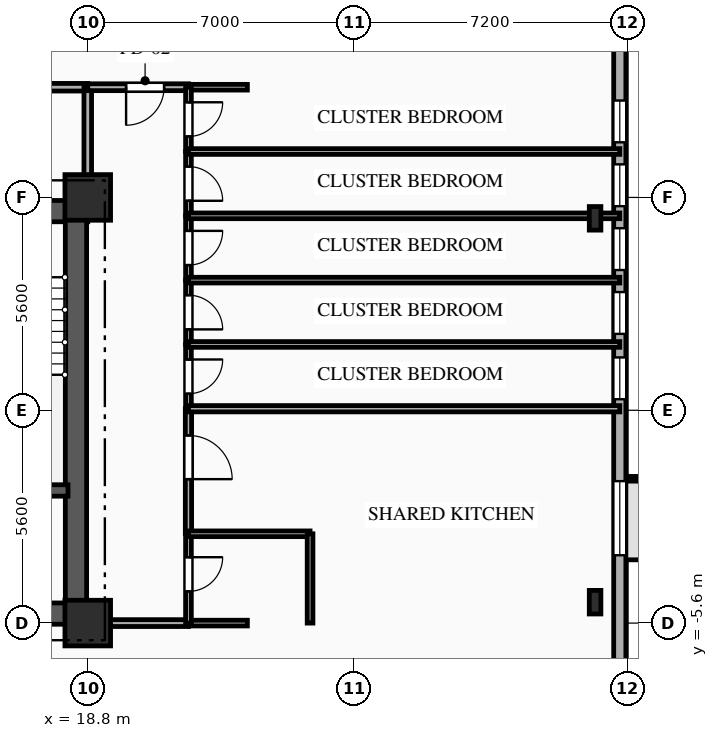
"""IFC4 building model, lengths in metres.
Left out: names, types, materials, properties, quantities, classifications, styles, units other than length and angle.
Written with IfcOpenShell. Run it as: python <this file> out.ifc"""

import sys

from ifc_helpers import new_model, si_unit, direction, frame, frame_2d, origin, origin_2d, place, context, subcontext, project, spatial, rectangle, i_section, extrude, element, fill, save


model = new_model("IFC4")
c1 = context("Model", 3, precision=1e-05, world=origin(), true_north=direction((0.0, 1.0)))
c2 = subcontext(c1, "Body", "Model", "MODEL_VIEW")
j1 = project(units=[si_unit("LENGTHUNIT", "METRE"), si_unit("PLANEANGLEUNIT", "RADIAN")], contexts=[c1])
p1 = place(None, origin())
s1 = spatial("IfcSite", under=j1, at=p1, CompositionType="ELEMENT")
p2 = place(p1, origin())
s2 = spatial("IfcBuilding", under=s1, at=p2, CompositionType="ELEMENT")
p3 = place(p2, frame((0.0, 0.0, 53.8)))
s3 = spatial("IfcBuildingStorey", under=s2, at=p3, CompositionType="ELEMENT", Elevation=53.8)
for number, where, z_axis, x_axis in (
    (1, (18.8, -5.6, 0.0), (0.0, 0.0, 1.0), (1.0, 0.0, 0.0)),
    (2, (18.8, 5.6, 0.0), (0.0, 0.0, 1.0), (1.0, 0.0, 0.0)),
):
    element("IfcColumn", number, at=place(p3, frame(where, z_axis=z_axis, x_axis=x_axis)), inside=s3, PredefinedType="COLUMN", context=c2, shape_type="SweptSolid", body=[
        extrude(rectangle(XDim=1.2, YDim=1.2, at=origin_2d()), origin(), (0.0, 0.0, 1.0), 3.35),
    ])
for number, where, z_axis, x_axis in (
    (3, (32.15, -5.05, 0.0), (0.0, 0.0, 1.0), (1.0, 0.0, 0.0)),
    (4, (32.15, 5.05, 0.0), (0.0, 0.0, 1.0), (1.0, 0.0, 0.0)),
):
    element("IfcColumn", number, at=place(p3, frame(where, z_axis=z_axis, x_axis=x_axis)), inside=s3, PredefinedType="COLUMN", context=c2, shape_type="SweptSolid", body=[
        extrude(i_section(OverallWidth=0.305, OverallDepth=0.62, WebThickness=0.021, FlangeThickness=0.04, FilletRadius=0.027, at=origin_2d()), origin(), (0.0, 0.0, 1.0), 3.35),
    ])
p4 = place(p3, frame((32.8, 15.8, 0.0), z_axis=(0.0, 0.0, 1.0), x_axis=(0.0, -1.0, 0.0)))
e5 = element("IfcWall", 5, at=p4, inside=s3, PredefinedType="SOLIDWALL", context=c2, shape_type="SweptSolid", body=[
    extrude(rectangle(XDim=31.6, YDim=0.32, at=frame_2d((15.8, 0.0))), origin(), (0.0, 0.0, 1.0), 3.035),
])
p5 = place(p4, frame((7.65, 0.0, 0.85)))
e6 = element("IfcOpeningElement", 6, at=p5, cuts=e5, PredefinedType="OPENING", context=c2, shape_type="SweptSolid", body=[
    extrude(rectangle(XDim=1.1, YDim=1.85, at=frame_2d((0.55, 0.925))), frame((0.0, 0.17, 0.0), z_axis=(0.0, -1.0, 0.0), x_axis=(1.0, 0.0, 0.0)), (0.0, 0.0, 1.0), 0.34),
])
p6 = place(p4, frame((9.33, 0.0, 0.85)))
e7 = element("IfcOpeningElement", 7, at=p6, cuts=e5, PredefinedType="OPENING", context=c2, shape_type="SweptSolid", body=[
    extrude(rectangle(XDim=1.1, YDim=1.85, at=frame_2d((0.55, 0.925))), frame((0.0, 0.17, 0.0), z_axis=(0.0, -1.0, 0.0), x_axis=(1.0, 0.0, 0.0)), (0.0, 0.0, 1.0), 0.34),
])
p7 = place(p4, frame((11.01, 0.0, 0.85)))
e8 = element("IfcOpeningElement", 8, at=p7, cuts=e5, PredefinedType="OPENING", context=c2, shape_type="SweptSolid", body=[
    extrude(rectangle(XDim=1.1, YDim=1.85, at=frame_2d((0.55, 0.925))), frame((0.0, 0.17, 0.0), z_axis=(0.0, -1.0, 0.0), x_axis=(1.0, 0.0, 0.0)), (0.0, 0.0, 1.0), 0.34),
])
p8 = place(p4, frame((12.69, 0.0, 0.85)))
e9 = element("IfcOpeningElement", 9, at=p8, cuts=e5, PredefinedType="OPENING", context=c2, shape_type="SweptSolid", body=[
    extrude(rectangle(XDim=1.1, YDim=1.85, at=frame_2d((0.55, 0.925))), frame((0.0, 0.17, 0.0), z_axis=(0.0, -1.0, 0.0), x_axis=(1.0, 0.0, 0.0)), (0.0, 0.0, 1.0), 0.34),
])
p9 = place(p4, frame((14.41, 0.0, 0.85)))
e10 = element("IfcOpeningElement", 10, at=p9, cuts=e5, PredefinedType="OPENING", context=c2, shape_type="SweptSolid", body=[
    extrude(rectangle(XDim=1.1, YDim=1.85, at=frame_2d((0.55, 0.925))), frame((0.0, 0.17, 0.0), z_axis=(0.0, -1.0, 0.0), x_axis=(1.0, 0.0, 0.0)), (0.0, 0.0, 1.0), 0.34),
])
p10 = place(p4, frame((17.665, 0.0, 0.85)))
e11 = element("IfcOpeningElement", 11, at=p10, cuts=e5, PredefinedType="OPENING", context=c2, shape_type="SweptSolid", body=[
    extrude(rectangle(XDim=1.95, YDim=1.85, at=frame_2d((0.975, 0.925))), frame((0.0, 0.17, 0.0), z_axis=(0.0, -1.0, 0.0), x_axis=(1.0, 0.0, 0.0)), (0.0, 0.0, 1.0), 0.34),
])
p11 = place(p3, frame((9.2, 5.24, 0.0), z_axis=(0.0, 0.0, 1.0), x_axis=(1.0, 0.0, 0.0)))
e12 = element("IfcWall", 12, at=p11, inside=s3, PredefinedType="SHEAR", context=c2, shape_type="SweptSolid", body=[
    extrude(rectangle(XDim=9.6, YDim=0.56, at=frame_2d((4.8, 0.0))), origin(), (0.0, 0.0, 1.0), 3.035),
])
p12 = place(p11, frame((6.95, 0.0, 0.0)))
e13 = element("IfcOpeningElement", 13, at=p12, cuts=e12, PredefinedType="OPENING", context=c2, shape_type="SweptSolid", body=[
    extrude(rectangle(XDim=1.1, YDim=2.15, at=frame_2d((0.55, 1.075))), frame((0.0, 0.29, 0.0), z_axis=(0.0, -1.0, 0.0), x_axis=(1.0, 0.0, 0.0)), (0.0, 0.0, 1.0), 0.58),
])
p13 = place(p11, frame((3.775, 0.0, 0.0)))
e14 = element("IfcOpeningElement", 14, at=p13, cuts=e12, PredefinedType="OPENING", context=c2, shape_type="SweptSolid", body=[
    extrude(rectangle(XDim=1.05, YDim=2.1, at=frame_2d((0.525, 1.05))), frame((0.0, 0.29, 0.0), z_axis=(0.0, -1.0, 0.0), x_axis=(1.0, 0.0, 0.0)), (0.0, 0.0, 1.0), 0.58),
])
p14 = place(p3, frame((9.2, -5.35, 0.0), z_axis=(0.0, 0.0, 1.0), x_axis=(1.0, 0.0, 0.0)))
e15 = element("IfcWall", 15, at=p14, inside=s3, PredefinedType="SHEAR", context=c2, shape_type="SweptSolid", body=[
    extrude(rectangle(XDim=9.6, YDim=0.56, at=frame_2d((4.8, 0.0))), origin(), (0.0, 0.0, 1.0), 3.035),
])
p15 = place(p14, frame((7.65, 0.0, 0.0)))
e16 = element("IfcOpeningElement", 16, at=p15, cuts=e15, PredefinedType="OPENING", context=c2, shape_type="SweptSolid", body=[
    extrude(rectangle(XDim=0.9, YDim=2.1, at=frame_2d((0.45, 1.05))), frame((0.0, 0.29, 0.0), z_axis=(0.0, -1.0, 0.0), x_axis=(1.0, 0.0, 0.0)), (0.0, 0.0, 1.0), 0.58),
])
p16 = place(p3, frame((18.49, -5.05, 0.0), z_axis=(0.0, 0.0, 1.0), x_axis=(0.0, 1.0, 0.0)))
e17 = element("IfcWall", 17, at=p16, inside=s3, PredefinedType="SHEAR", context=c2, shape_type="SweptSolid", body=[
    extrude(rectangle(XDim=10.1, YDim=0.56, at=frame_2d((5.05, 0.0))), origin(), (0.0, 0.0, 1.0), 3.035),
])
p17 = place(p3, frame((15.1, -2.11, 0.0), z_axis=(0.0, 0.0, 1.0), x_axis=(1.0, 0.0, 0.0)))
e18 = element("IfcWall", 18, at=p17, inside=s3, PredefinedType="SHEAR", context=c2, shape_type="SweptSolid", body=[
    extrude(rectangle(XDim=3.18, YDim=0.3, at=frame_2d((1.59, 0.0))), origin(), (0.0, 0.0, 1.0), 3.035),
])
p18 = place(p3, frame((18.8, 8.5, 0.0), z_axis=(0.0, 0.0, 1.0), x_axis=(-1.0, 0.0, 0.0)))
e19 = element("IfcWall", 19, at=p18, inside=s3, PredefinedType="PARTITIONING", context=c2, shape_type="SweptSolid", body=[
    extrude(rectangle(XDim=6.8, YDim=0.2, at=frame_2d((3.4, 0.0))), origin(), (0.0, 0.0, 1.0), 3.035),
])
p19 = place(p18, frame((3.985, 0.0, 0.0)))
e20 = element("IfcOpeningElement", 20, at=p19, cuts=e19, PredefinedType="OPENING", context=c2, shape_type="SweptSolid", body=[
    extrude(rectangle(XDim=1.1, YDim=2.15, at=frame_2d((0.55, 1.075))), frame((0.0, 0.11, 0.0), z_axis=(0.0, -1.0, 0.0), x_axis=(1.0, 0.0, 0.0)), (0.0, 0.0, 1.0), 0.22),
])
p20 = place(p3, frame((18.8, 5.6, 0.0), z_axis=(0.0, 0.0, 1.0), x_axis=(0.0, 1.0, 0.0)))
e21 = element("IfcWall", 21, at=p20, inside=s3, PredefinedType="PARTITIONING", context=c2, shape_type="SweptSolid", body=[
    extrude(rectangle(XDim=2.9, YDim=0.2, at=frame_2d((1.45, 0.0))), origin(), (0.0, 0.0, 1.0), 2.52),
])
p21 = place(p3, frame((21.45, 8.5, 0.0), z_axis=(0.0, 0.0, 1.0), x_axis=(-1.0, 0.0, 0.0)))
e22 = element("IfcWall", 22, at=p21, inside=s3, PredefinedType="PARTITIONING", context=c2, shape_type="SweptSolid", body=[
    extrude(rectangle(XDim=2.65, YDim=0.18, at=frame_2d((1.325, 0.0))), origin(), (0.0, 0.0, 1.0), 3.035),
])
p22 = place(p21, frame((0.641, 0.0, 0.0)))
e23 = element("IfcOpeningElement", 23, at=p22, cuts=e22, PredefinedType="OPENING", context=c2, shape_type="SweptSolid", body=[
    extrude(rectangle(XDim=1.0, YDim=2.15, at=frame_2d((0.5, 1.075))), frame((0.0, 0.1, 0.0), z_axis=(0.0, -1.0, 0.0), x_axis=(1.0, 0.0, 0.0)), (0.0, 0.0, 1.0), 0.2),
])
p23 = place(p3, frame((23.0, 8.5, 0.0), z_axis=(0.0, 0.0, 1.0), x_axis=(-1.0, 0.0, 0.0)))
e24 = element("IfcWall", 24, at=p23, inside=s3, PredefinedType="PARTITIONING", context=c2, shape_type="SweptSolid", body=[
    extrude(rectangle(XDim=1.55, YDim=0.15, at=frame_2d((0.775, 0.0))), origin(), (0.0, 0.0, 1.0), 3.035),
])
p24 = place(p3, frame((18.8, -5.6, 0.0), z_axis=(0.0, 0.0, 1.0), x_axis=(1.0, 0.0, 0.0)))
e25 = element("IfcWall", 25, at=p24, inside=s3, PredefinedType="PARTITIONING", context=c2, shape_type="SweptSolid", body=[
    extrude(rectangle(XDim=2.65, YDim=0.18, at=frame_2d((1.325, 0.0))), origin(), (0.0, 0.0, 1.0), 3.035),
])
p25 = place(p3, frame((21.45, -5.6, 0.0), z_axis=(0.0, 0.0, 1.0), x_axis=(1.0, 0.0, 0.0)))
e26 = element("IfcWall", 26, at=p25, inside=s3, PredefinedType="PLUMBINGWALL", context=c2, shape_type="SweptSolid", body=[
    extrude(rectangle(XDim=1.55, YDim=0.15, at=frame_2d((0.775, 0.0))), origin(), (0.0, 0.0, 1.0), 3.035),
])
p26 = place(p3, frame((21.45, -3.25, 0.0), z_axis=(0.0, 0.0, 1.0), x_axis=(0.0, -1.0, 0.0)))
e27 = element("IfcWall", 27, at=p26, inside=s3, PredefinedType="PLUMBINGWALL", context=c2, shape_type="SweptSolid", body=[
    extrude(rectangle(XDim=2.35, YDim=0.15, at=frame_2d((1.175, 0.0))), origin(), (0.0, 0.0, 1.0), 3.035),
])
p27 = place(p26, frame((0.616, 0.0, 0.0)))
e28 = element("IfcOpeningElement", 28, at=p27, cuts=e27, PredefinedType="OPENING", context=c2, shape_type="SweptSolid", body=[
    extrude(rectangle(XDim=0.9, YDim=2.1, at=frame_2d((0.45, 1.05))), frame((0.0, 0.085, 0.0), z_axis=(0.0, -1.0, 0.0), x_axis=(1.0, 0.0, 0.0)), (0.0, 0.0, 1.0), 0.17),
])
p28 = place(p3, frame((21.45, 0.04, 0.0), z_axis=(0.0, 0.0, 1.0), x_axis=(0.0, -1.0, 0.0)))
e29 = element("IfcWall", 29, at=p28, inside=s3, PredefinedType="PARTITIONING", context=c2, shape_type="SweptSolid", body=[
    extrude(rectangle(XDim=3.29, YDim=0.165, at=frame_2d((1.645, 0.0))), origin(), (0.0, 0.0, 1.0), 3.035),
])
p29 = place(p28, frame((0.702, 0.0, 0.0)))
e30 = element("IfcOpeningElement", 30, at=p29, cuts=e29, PredefinedType="OPENING", context=c2, shape_type="SweptSolid", body=[
    extrude(rectangle(XDim=1.15, YDim=2.15, at=frame_2d((0.575, 1.075))), frame((0.0, 0.093, 0.0), z_axis=(0.0, -1.0, 0.0), x_axis=(1.0, 0.0, 0.0)), (0.0, 0.0, 1.0), 0.185),
])
p30 = place(p3, frame((21.45, 1.732, 0.0), z_axis=(0.0, 0.0, 1.0), x_axis=(0.0, -1.0, 0.0)))
e31 = element("IfcWall", 31, at=p30, inside=s3, PredefinedType="PARTITIONING", context=c2, shape_type="SweptSolid", body=[
    extrude(rectangle(XDim=1.692, YDim=0.15, at=frame_2d((0.846, 0.0))), origin(), (0.0, 0.0, 1.0), 3.035),
])
p31 = place(p30, frame((0.396, 0.0, 0.0)))
e32 = element("IfcOpeningElement", 32, at=p31, cuts=e31, PredefinedType="OPENING", context=c2, shape_type="SweptSolid", body=[
    extrude(rectangle(XDim=0.9, YDim=2.1, at=frame_2d((0.45, 1.05))), frame((0.0, 0.085, 0.0), z_axis=(0.0, -1.0, 0.0), x_axis=(1.0, 0.0, 0.0)), (0.0, 0.0, 1.0), 0.17),
])
p32 = place(p3, frame((21.45, 3.424, 0.0), z_axis=(0.0, 0.0, 1.0), x_axis=(0.0, -1.0, 0.0)))
e33 = element("IfcWall", 33, at=p32, inside=s3, PredefinedType="PARTITIONING", context=c2, shape_type="SweptSolid", body=[
    extrude(rectangle(XDim=1.692, YDim=0.15, at=frame_2d((0.846, 0.0))), origin(), (0.0, 0.0, 1.0), 3.035),
])
p33 = place(p32, frame((0.396, 0.0, 0.0)))
e34 = element("IfcOpeningElement", 34, at=p33, cuts=e33, PredefinedType="OPENING", context=c2, shape_type="SweptSolid", body=[
    extrude(rectangle(XDim=0.9, YDim=2.1, at=frame_2d((0.45, 1.05))), frame((0.0, 0.085, 0.0), z_axis=(0.0, -1.0, 0.0), x_axis=(1.0, 0.0, 0.0)), (0.0, 0.0, 1.0), 0.17),
])
p34 = place(p3, frame((21.45, 5.116, 0.0), z_axis=(0.0, 0.0, 1.0), x_axis=(0.0, -1.0, 0.0)))
e35 = element("IfcWall", 35, at=p34, inside=s3, PredefinedType="PARTITIONING", context=c2, shape_type="SweptSolid", body=[
    extrude(rectangle(XDim=1.692, YDim=0.15, at=frame_2d((0.846, 0.0))), origin(), (0.0, 0.0, 1.0), 3.035),
])
p35 = place(p34, frame((0.396, 0.0, 0.0)))
e36 = element("IfcOpeningElement", 36, at=p35, cuts=e35, PredefinedType="OPENING", context=c2, shape_type="SweptSolid", body=[
    extrude(rectangle(XDim=0.9, YDim=2.1, at=frame_2d((0.45, 1.05))), frame((0.0, 0.085, 0.0), z_axis=(0.0, -1.0, 0.0), x_axis=(1.0, 0.0, 0.0)), (0.0, 0.0, 1.0), 0.17),
])
p36 = place(p3, frame((21.45, 6.808, 0.0), z_axis=(0.0, 0.0, 1.0), x_axis=(0.0, -1.0, 0.0)))
e37 = element("IfcWall", 37, at=p36, inside=s3, PredefinedType="PARTITIONING", context=c2, shape_type="SweptSolid", body=[
    extrude(rectangle(XDim=1.692, YDim=0.15, at=frame_2d((0.846, 0.0))), origin(), (0.0, 0.0, 1.0), 3.035),
])
p37 = place(p36, frame((0.396, 0.0, 0.0)))
e38 = element("IfcOpeningElement", 38, at=p37, cuts=e37, PredefinedType="OPENING", context=c2, shape_type="SweptSolid", body=[
    extrude(rectangle(XDim=0.9, YDim=2.1, at=frame_2d((0.45, 1.05))), frame((0.0, 0.085, 0.0), z_axis=(0.0, -1.0, 0.0), x_axis=(1.0, 0.0, 0.0)), (0.0, 0.0, 1.0), 0.17),
])
p38 = place(p3, frame((21.45, 8.5, 0.0), z_axis=(0.0, 0.0, 1.0), x_axis=(0.0, -1.0, 0.0)))
e39 = element("IfcWall", 39, at=p38, inside=s3, PredefinedType="PARTITIONING", context=c2, shape_type="SweptSolid", body=[
    extrude(rectangle(XDim=1.692, YDim=0.15, at=frame_2d((0.846, 0.0))), origin(), (0.0, 0.0, 1.0), 3.035),
])
p39 = place(p38, frame((0.396, 0.0, 0.0)))
e40 = element("IfcOpeningElement", 40, at=p39, cuts=e39, PredefinedType="OPENING", context=c2, shape_type="SweptSolid", body=[
    extrude(rectangle(XDim=0.9, YDim=2.1, at=frame_2d((0.45, 1.05))), frame((0.0, 0.085, 0.0), z_axis=(0.0, -1.0, 0.0), x_axis=(1.0, 0.0, 0.0)), (0.0, 0.0, 1.0), 0.17),
])
p40 = place(p3, frame((21.45, -3.25, 0.0), z_axis=(0.0, 0.0, 1.0), x_axis=(1.0, 0.0, 0.0)))
e41 = element("IfcWall", 41, at=p40, inside=s3, PredefinedType="PLUMBINGWALL", context=c2, shape_type="SweptSolid", body=[
    extrude(rectangle(XDim=3.2, YDim=0.15, at=frame_2d((1.6, 0.0))), origin(), (0.0, 0.0, 1.0), 2.52),
])
p41 = place(p3, frame((24.65, -3.25, 0.0), z_axis=(0.0, 0.0, 1.0), x_axis=(0.0, -1.0, 0.0)))
e42 = element("IfcWall", 42, at=p41, inside=s3, PredefinedType="PLUMBINGWALL", context=c2, shape_type="SweptSolid", body=[
    extrude(rectangle(XDim=2.35, YDim=0.15, at=frame_2d((1.175, 0.0))), origin(), (0.0, 0.0, 1.0), 3.035),
])
p42 = place(p3, frame((21.45, 0.04, 0.0), z_axis=(0.0, 0.0, 1.0), x_axis=(1.0, 0.0, 0.0)))
e43 = element("IfcWall", 43, at=p42, inside=s3, PredefinedType="PARTITIONING", context=c2, shape_type="SweptSolid", body=[
    extrude(rectangle(XDim=11.35, YDim=0.165, at=frame_2d((5.675, 0.0))), origin(), (0.0, 0.0, 1.0), 3.035),
])
p43 = place(p3, frame((21.45, 1.732, 0.0), z_axis=(0.0, 0.0, 1.0), x_axis=(1.0, 0.0, 0.0)))
e44 = element("IfcWall", 44, at=p43, inside=s3, PredefinedType="PARTITIONING", context=c2, shape_type="SweptSolid", body=[
    extrude(rectangle(XDim=11.35, YDim=0.15, at=frame_2d((5.675, 0.0))), origin(), (0.0, 0.0, 1.0), 3.035),
])
for number, where, z_axis, x_axis in (
    (45, (21.45, 3.424, 0.0), (0.0, 0.0, 1.0), (1.0, 0.0, 0.0)),
    (46, (21.45, 5.116, 0.0), (0.0, 0.0, 1.0), (1.0, 0.0, 0.0)),
):
    element("IfcWall", number, at=place(p3, frame(where, z_axis=z_axis, x_axis=x_axis)), inside=s3, PredefinedType="PARTITIONING", context=c2, shape_type="SweptSolid", body=[
        extrude(rectangle(XDim=11.35, YDim=0.15, at=frame_2d((5.675, 0.0))), origin(), (0.0, 0.0, 1.0), 2.52),
    ])
p44 = place(p3, frame((21.45, 6.808, 0.0), z_axis=(0.0, 0.0, 1.0), x_axis=(1.0, 0.0, 0.0)))
e47 = element("IfcWall", 47, at=p44, inside=s3, PredefinedType="PARTITIONING", context=c2, shape_type="SweptSolid", body=[
    extrude(rectangle(XDim=11.35, YDim=0.15, at=frame_2d((5.675, 0.0))), origin(), (0.0, 0.0, 1.0), 3.035),
])
p45 = place(p5, origin())
e48 = element("IfcWindow", 48, at=p45, inside=s3, PartitioningType="SINGLE_PANEL", PredefinedType="WINDOW", context=c2, shape_type="SweptSolid", body=[
    extrude(rectangle(XDim=1.1, YDim=1.85, at=frame_2d((0.55, 0.925))), frame((0.0, 0.03, 0.0), z_axis=(0.0, -1.0, 0.0), x_axis=(1.0, 0.0, 0.0)), (0.0, 0.0, 1.0), 0.06),
])
fill(e6, e48)
p46 = place(p6, origin())
e49 = element("IfcWindow", 49, at=p46, inside=s3, PartitioningType="SINGLE_PANEL", PredefinedType="WINDOW", context=c2, shape_type="SweptSolid", body=[
    extrude(rectangle(XDim=1.1, YDim=1.85, at=frame_2d((0.55, 0.925))), frame((0.0, 0.03, 0.0), z_axis=(0.0, -1.0, 0.0), x_axis=(1.0, 0.0, 0.0)), (0.0, 0.0, 1.0), 0.06),
])
fill(e7, e49)
p47 = place(p7, origin())
e50 = element("IfcWindow", 50, at=p47, inside=s3, PartitioningType="SINGLE_PANEL", PredefinedType="WINDOW", context=c2, shape_type="SweptSolid", body=[
    extrude(rectangle(XDim=1.1, YDim=1.85, at=frame_2d((0.55, 0.925))), frame((0.0, 0.03, 0.0), z_axis=(0.0, -1.0, 0.0), x_axis=(1.0, 0.0, 0.0)), (0.0, 0.0, 1.0), 0.06),
])
fill(e8, e50)
p48 = place(p8, origin())
e51 = element("IfcWindow", 51, at=p48, inside=s3, PartitioningType="SINGLE_PANEL", PredefinedType="WINDOW", context=c2, shape_type="SweptSolid", body=[
    extrude(rectangle(XDim=1.1, YDim=1.85, at=frame_2d((0.55, 0.925))), frame((0.0, 0.03, 0.0), z_axis=(0.0, -1.0, 0.0), x_axis=(1.0, 0.0, 0.0)), (0.0, 0.0, 1.0), 0.06),
])
fill(e9, e51)
p49 = place(p9, origin())
e52 = element("IfcWindow", 52, at=p49, inside=s3, PartitioningType="SINGLE_PANEL", PredefinedType="WINDOW", context=c2, shape_type="SweptSolid", body=[
    extrude(rectangle(XDim=1.1, YDim=1.85, at=frame_2d((0.55, 0.925))), frame((0.0, 0.03, 0.0), z_axis=(0.0, -1.0, 0.0), x_axis=(1.0, 0.0, 0.0)), (0.0, 0.0, 1.0), 0.06),
])
fill(e10, e52)
p50 = place(p10, origin())
e53 = element("IfcWindow", 53, at=p50, inside=s3, PartitioningType="SINGLE_PANEL", PredefinedType="WINDOW", context=c2, shape_type="SweptSolid", body=[
    extrude(rectangle(XDim=1.95, YDim=1.85, at=frame_2d((0.975, 0.925))), frame((0.0, 0.03, 0.0), z_axis=(0.0, -1.0, 0.0), x_axis=(1.0, 0.0, 0.0)), (0.0, 0.0, 1.0), 0.06),
])
fill(e11, e53)
p51 = place(p22, origin())
e54 = element("IfcDoor", 54, at=p51, inside=s3, OperationType="SINGLE_SWING_RIGHT", PredefinedType="DOOR", context=c2, shape_type="SweptSolid", body=[
    extrude(rectangle(XDim=1.0, YDim=2.15, at=frame_2d((0.5, 1.075))), frame((0.0, 0.025, 0.0), z_axis=(0.0, -1.0, 0.0), x_axis=(1.0, 0.0, 0.0)), (0.0, 0.0, 1.0), 0.05),
])
fill(e23, e54)
p52 = place(p27, origin())
e55 = element("IfcDoor", 55, at=p52, inside=s3, OperationType="SINGLE_SWING_LEFT", PredefinedType="DOOR", context=c2, shape_type="SweptSolid", body=[
    extrude(rectangle(XDim=0.9, YDim=2.1, at=frame_2d((0.45, 1.05))), frame((0.0, 0.025, 0.0), z_axis=(0.0, -1.0, 0.0), x_axis=(1.0, 0.0, 0.0)), (0.0, 0.0, 1.0), 0.05),
])
fill(e28, e55)
p53 = place(p29, origin())
e56 = element("IfcDoor", 56, at=p53, inside=s3, OperationType="SINGLE_SWING_RIGHT", PredefinedType="DOOR", context=c2, shape_type="SweptSolid", body=[
    extrude(rectangle(XDim=1.15, YDim=2.15, at=frame_2d((0.575, 1.075))), frame((0.0, 0.025, 0.0), z_axis=(0.0, -1.0, 0.0), x_axis=(1.0, 0.0, 0.0)), (0.0, 0.0, 1.0), 0.05),
])
fill(e30, e56)
p54 = place(p31, origin())
e57 = element("IfcDoor", 57, at=p54, inside=s3, OperationType="SINGLE_SWING_LEFT", PredefinedType="DOOR", context=c2, shape_type="SweptSolid", body=[
    extrude(rectangle(XDim=0.9, YDim=2.1, at=frame_2d((0.45, 1.05))), frame((0.0, 0.025, 0.0), z_axis=(0.0, -1.0, 0.0), x_axis=(1.0, 0.0, 0.0)), (0.0, 0.0, 1.0), 0.05),
])
fill(e32, e57)
p55 = place(p33, origin())
e58 = element("IfcDoor", 58, at=p55, inside=s3, OperationType="SINGLE_SWING_RIGHT", PredefinedType="DOOR", context=c2, shape_type="SweptSolid", body=[
    extrude(rectangle(XDim=0.9, YDim=2.1, at=frame_2d((0.45, 1.05))), frame((0.0, 0.025, 0.0), z_axis=(0.0, -1.0, 0.0), x_axis=(1.0, 0.0, 0.0)), (0.0, 0.0, 1.0), 0.05),
])
fill(e34, e58)
p56 = place(p35, origin())
e59 = element("IfcDoor", 59, at=p56, inside=s3, OperationType="SINGLE_SWING_LEFT", PredefinedType="DOOR", context=c2, shape_type="SweptSolid", body=[
    extrude(rectangle(XDim=0.9, YDim=2.1, at=frame_2d((0.45, 1.05))), frame((0.0, 0.025, 0.0), z_axis=(0.0, -1.0, 0.0), x_axis=(1.0, 0.0, 0.0)), (0.0, 0.0, 1.0), 0.05),
])
fill(e36, e59)
p57 = place(p37, origin())
e60 = element("IfcDoor", 60, at=p57, inside=s3, OperationType="SINGLE_SWING_RIGHT", PredefinedType="DOOR", context=c2, shape_type="SweptSolid", body=[
    extrude(rectangle(XDim=0.9, YDim=2.1, at=frame_2d((0.45, 1.05))), frame((0.0, 0.025, 0.0), z_axis=(0.0, -1.0, 0.0), x_axis=(1.0, 0.0, 0.0)), (0.0, 0.0, 1.0), 0.05),
])
fill(e38, e60)
p58 = place(p39, origin())
e61 = element("IfcDoor", 61, at=p58, inside=s3, OperationType="SINGLE_SWING_LEFT", PredefinedType="DOOR", context=c2, shape_type="SweptSolid", body=[
    extrude(rectangle(XDim=0.9, YDim=2.1, at=frame_2d((0.45, 1.05))), frame((0.0, 0.025, 0.0), z_axis=(0.0, -1.0, 0.0), x_axis=(1.0, 0.0, 0.0)), (0.0, 0.0, 1.0), 0.05),
])
fill(e40, e61)
save(model, sys.argv[1])
